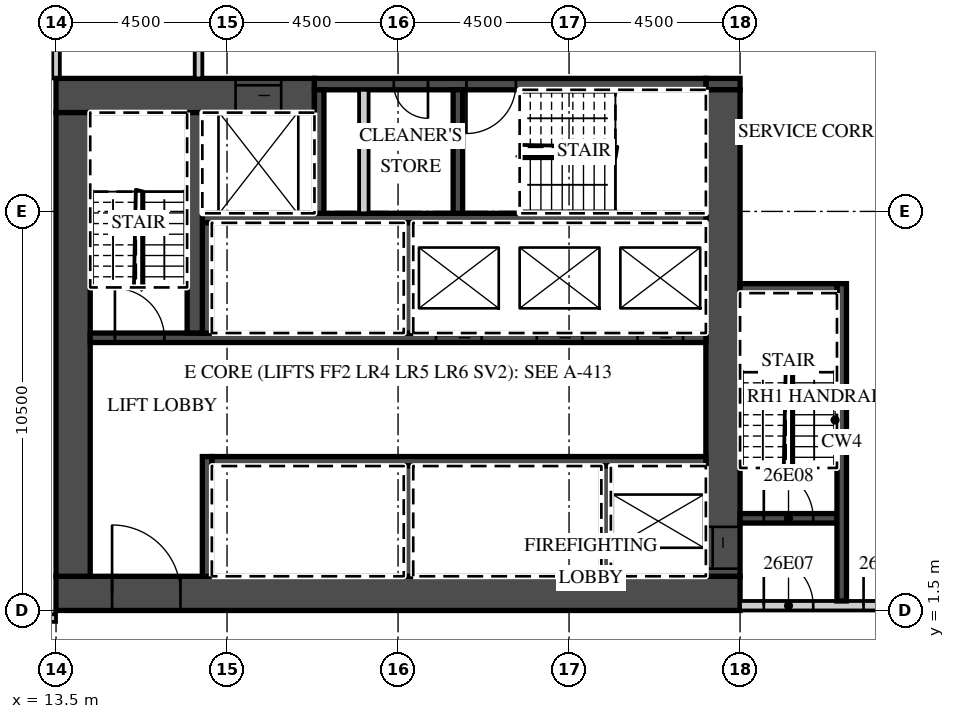
"""IFC4 building model, lengths in metres.
Left out: names, types, materials, properties, quantities, classifications, styles, units other than length and angle.
Written with IfcOpenShell. Run it as: python <this file> out.ifc"""

import sys

from ifc_helpers import new_model, si_unit, direction, frame, frame_2d, origin, place, context, subcontext, project, spatial, rectangle, extrude, element, fill, save


model = new_model("IFC4")
c1 = context("Model", 3, precision=1e-05, world=origin(), true_north=direction((0.0, 1.0)))
c2 = subcontext(c1, "Body", "Model", "MODEL_VIEW")
j1 = project(units=[si_unit("LENGTHUNIT", "METRE"), si_unit("PLANEANGLEUNIT", "RADIAN")], contexts=[c1])
p1 = place(None, origin())
s1 = spatial("IfcSite", under=j1, at=p1, CompositionType="ELEMENT")
p2 = place(p1, origin())
s2 = spatial("IfcBuilding", under=s1, at=p2, CompositionType="ELEMENT")
p3 = place(p2, frame((0.0, 0.0, 120.7)))
s3 = spatial("IfcBuildingStorey", under=s2, at=p3, CompositionType="ELEMENT", Elevation=120.7)
p4 = place(p3, frame((13.5, 15.5, 0.0), z_axis=(0.0, 0.0, 1.0), x_axis=(0.0, 1.0, 0.0)))
e1 = element("IfcWall", 1, at=p4, inside=s3, PredefinedType="PARTITIONING", context=c2, shape_type="SweptSolid", body=[
    extrude(rectangle(XDim=7.162, YDim=0.2, at=frame_2d((3.581, 0.0))), origin(), (0.0, 0.0, 1.0), 3.02),
])
p5 = place(p3, frame((-39.316, 1.3, 0.0), z_axis=(0.0, 0.0, 1.0), x_axis=(1.0, 0.0, 0.0)))
e2 = element("IfcWall", 2, at=p5, inside=s3, PredefinedType="PARTITIONING", context=c2, shape_type="SweptSolid", body=[
    extrude(rectangle(XDim=52.816, YDim=0.2, at=frame_2d((26.408, 0.0))), origin(), (0.0, 0.0, 1.0), 3.02),
])
p6 = place(p5, frame((0.15, 0.0, 0.0)))
e3 = element("IfcOpeningElement", 3, at=p6, cuts=e2, PredefinedType="OPENING", context=c2, shape_type="SweptSolid", body=[
    extrude(rectangle(XDim=0.9, YDim=2.1, at=frame_2d((0.45, 1.05))), frame((0.0, 0.11, 0.0), z_axis=(0.0, -1.0, 0.0), x_axis=(1.0, 0.0, 0.0)), (0.0, 0.0, 1.0), 0.22),
])
p7 = place(p5, frame((3.891, 0.0, 0.0)))
e4 = element("IfcOpeningElement", 4, at=p7, cuts=e2, PredefinedType="OPENING", context=c2, shape_type="SweptSolid", body=[
    extrude(rectangle(XDim=1.0, YDim=2.1, at=frame_2d((0.5, 1.05))), frame((0.0, 0.11, 0.0), z_axis=(0.0, -1.0, 0.0), x_axis=(1.0, 0.0, 0.0)), (0.0, 0.0, 1.0), 0.22),
])
p8 = place(p5, frame((10.741, 0.0, 0.0)))
e5 = element("IfcOpeningElement", 5, at=p8, cuts=e2, PredefinedType="OPENING", context=c2, shape_type="SweptSolid", body=[
    extrude(rectangle(XDim=1.0, YDim=2.1, at=frame_2d((0.5, 1.05))), frame((0.0, 0.11, 0.0), z_axis=(0.0, -1.0, 0.0), x_axis=(1.0, 0.0, 0.0)), (0.0, 0.0, 1.0), 0.22),
])
p9 = place(p5, frame((15.266, 0.0, 0.0)))
e6 = element("IfcOpeningElement", 6, at=p9, cuts=e2, PredefinedType="OPENING", context=c2, shape_type="SweptSolid", body=[
    extrude(rectangle(XDim=1.0, YDim=2.1, at=frame_2d((0.5, 1.05))), frame((0.0, 0.11, 0.0), z_axis=(0.0, -1.0, 0.0), x_axis=(1.0, 0.0, 0.0)), (0.0, 0.0, 1.0), 0.22),
])
p10 = place(p5, frame((19.741, 0.0, 0.0)))
e7 = element("IfcOpeningElement", 7, at=p10, cuts=e2, PredefinedType="OPENING", context=c2, shape_type="SweptSolid", body=[
    extrude(rectangle(XDim=1.0, YDim=2.1, at=frame_2d((0.5, 1.05))), frame((0.0, 0.11, 0.0), z_axis=(0.0, -1.0, 0.0), x_axis=(1.0, 0.0, 0.0)), (0.0, 0.0, 1.0), 0.22),
])
p11 = place(p5, frame((26.678, 0.0, 0.0)))
e8 = element("IfcOpeningElement", 8, at=p11, cuts=e2, PredefinedType="OPENING", context=c2, shape_type="SweptSolid", body=[
    extrude(rectangle(XDim=1.2, YDim=2.1, at=frame_2d((0.6, 1.05))), frame((0.0, 0.11, 0.0), z_axis=(0.0, -1.0, 0.0), x_axis=(1.0, 0.0, 0.0)), (0.0, 0.0, 1.0), 0.22),
])
p12 = place(p5, frame((35.678, 0.0, 0.0)))
e9 = element("IfcOpeningElement", 9, at=p12, cuts=e2, PredefinedType="OPENING", context=c2, shape_type="SweptSolid", body=[
    extrude(rectangle(XDim=1.2, YDim=2.1, at=frame_2d((0.6, 1.05))), frame((0.0, 0.11, 0.0), z_axis=(0.0, -1.0, 0.0), x_axis=(1.0, 0.0, 0.0)), (0.0, 0.0, 1.0), 0.22),
])
p13 = place(p5, frame((41.754, 0.0, 0.0)))
e10 = element("IfcOpeningElement", 10, at=p13, cuts=e2, PredefinedType="OPENING", context=c2, shape_type="SweptSolid", body=[
    extrude(rectangle(XDim=1.2, YDim=2.1, at=frame_2d((0.6, 1.05))), frame((0.0, 0.11, 0.0), z_axis=(0.0, -1.0, 0.0), x_axis=(1.0, 0.0, 0.0)), (0.0, 0.0, 1.0), 0.22),
])
p14 = place(p5, frame((51.241, 0.0, 0.0)))
e11 = element("IfcOpeningElement", 11, at=p14, cuts=e2, PredefinedType="OPENING", context=c2, shape_type="SweptSolid", body=[
    extrude(rectangle(XDim=1.0, YDim=2.1, at=frame_2d((0.5, 1.05))), frame((0.0, 0.11, 0.0), z_axis=(0.0, -1.0, 0.0), x_axis=(1.0, 0.0, 0.0)), (0.0, 0.0, 1.0), 0.22),
])
p15 = place(p3, frame((13.5, 1.95, 0.0), z_axis=(0.0, 0.0, 1.0), x_axis=(1.0, 0.0, 0.0)))
e12 = element("IfcWall", 12, at=p15, inside=s3, PredefinedType="SHEAR", context=c2, shape_type="SweptSolid", body=[
    extrude(rectangle(XDim=18.0, YDim=0.9, at=frame_2d((9.0, 0.0))), origin(), (0.0, 0.0, 1.0), 3.02),
])
p16 = place(p15, frame((1.475, 0.0, 0.0)))
e13 = element("IfcOpeningElement", 13, at=p16, cuts=e12, PredefinedType="OPENING", context=c2, shape_type="SweptSolid", body=[
    extrude(rectangle(XDim=1.8, YDim=2.1, at=frame_2d((0.9, 1.05))), frame((0.0, 0.46, 0.0), z_axis=(0.0, -1.0, 0.0), x_axis=(1.0, 0.0, 0.0)), (0.0, 0.0, 1.0), 0.92),
])
p17 = place(p3, frame((13.5, 15.05, 0.0), z_axis=(0.0, 0.0, 1.0), x_axis=(1.0, 0.0, 0.0)))
e14 = element("IfcWall", 14, at=p17, inside=s3, PredefinedType="SHEAR", context=c2, shape_type="SweptSolid", body=[
    extrude(rectangle(XDim=6.8, YDim=0.9, at=frame_2d((3.4, 0.0))), origin(), (0.0, 0.0, 1.0), 3.02),
])
p18 = place(p17, frame((4.725, 0.0, 0.0)))
e15 = element("IfcOpeningElement", 15, at=p18, cuts=e14, PredefinedType="OPENING", context=c2, shape_type="SweptSolid", body=[
    extrude(rectangle(XDim=1.2, YDim=2.1, at=frame_2d((0.6, 1.05))), frame((0.0, 0.46, 0.0), z_axis=(0.0, -1.0, 0.0), x_axis=(1.0, 0.0, 0.0)), (0.0, 0.0, 1.0), 0.92),
])
p19 = place(p3, frame((30.6, 15.35, 0.0), z_axis=(0.0, 0.0, 1.0), x_axis=(1.0, 0.0, 0.0)))
e16 = element("IfcWall", 16, at=p19, inside=s3, PredefinedType="SHEAR", context=c2, shape_type="SweptSolid", body=[
    extrude(rectangle(XDim=0.9, YDim=0.3, at=frame_2d((0.45, 0.0))), origin(), (0.0, 0.0, 1.0), 3.02),
])
p20 = place(p3, frame((20.3, 15.35, 0.0), z_axis=(0.0, 0.0, 1.0), x_axis=(1.0, 0.0, 0.0)))
e17 = element("IfcWall", 17, at=p20, inside=s3, PredefinedType="SHEAR", context=c2, shape_type="SweptSolid", body=[
    extrude(rectangle(XDim=10.3, YDim=0.3, at=frame_2d((5.15, 0.0))), origin(), (0.0, 0.0, 1.0), 3.02),
])
p21 = place(p20, frame((4.0, 0.0, 0.0)))
e18 = element("IfcOpeningElement", 18, at=p21, cuts=e17, PredefinedType="OPENING", context=c2, shape_type="SweptSolid", body=[
    extrude(rectangle(XDim=1.3, YDim=2.1, at=frame_2d((0.65, 1.05))), frame((0.0, 0.16, 0.0), z_axis=(0.0, -1.0, 0.0), x_axis=(1.0, 0.0, 0.0)), (0.0, 0.0, 1.0), 0.32),
])
p22 = place(p20, frame((2.087, 0.0, 0.0)))
e19 = element("IfcOpeningElement", 19, at=p22, cuts=e17, PredefinedType="OPENING", context=c2, shape_type="SweptSolid", body=[
    extrude(rectangle(XDim=0.9, YDim=2.1, at=frame_2d((0.45, 1.05))), frame((0.0, 0.16, 0.0), z_axis=(0.0, -1.0, 0.0), x_axis=(1.0, 0.0, 0.0)), (0.0, 0.0, 1.0), 0.32),
])
p23 = place(p3, frame((31.05, 2.4, 0.0), z_axis=(0.0, 0.0, 1.0), x_axis=(0.0, 1.0, 0.0)))
e20 = element("IfcWall", 20, at=p23, inside=s3, PredefinedType="SHEAR", context=c2, shape_type="SweptSolid", body=[
    extrude(rectangle(XDim=12.8, YDim=0.9, at=frame_2d((6.4, 0.0))), origin(), (0.0, 0.0, 1.0), 3.02),
])
p24 = place(p23, frame((0.2, 0.0, 0.0)))
e21 = element("IfcOpeningElement", 21, at=p24, cuts=e20, PredefinedType="OPENING", context=c2, shape_type="SweptSolid", body=[
    extrude(rectangle(XDim=1.1, YDim=2.1, at=frame_2d((0.55, 1.05))), frame((0.0, 0.46, 0.0), z_axis=(0.0, -1.0, 0.0), x_axis=(1.0, 0.0, 0.0)), (0.0, 0.0, 1.0), 0.92),
])
p25 = place(p3, frame((13.95, 2.4, 0.0), z_axis=(0.0, 0.0, 1.0), x_axis=(0.0, 1.0, 0.0)))
e22 = element("IfcWall", 22, at=p25, inside=s3, PredefinedType="SHEAR", context=c2, shape_type="SweptSolid", body=[
    extrude(rectangle(XDim=12.2, YDim=0.9, at=frame_2d((6.1, 0.0))), origin(), (0.0, 0.0, 1.0), 3.02),
])
p26 = place(p3, frame((17.6, 5.425, 0.0), z_axis=(0.0, 0.0, 1.0), x_axis=(1.0, 0.0, 0.0)))
e23 = element("IfcWall", 23, at=p26, inside=s3, PredefinedType="SHEAR", context=c2, shape_type="SweptSolid", body=[
    extrude(rectangle(XDim=13.0, YDim=0.25, at=frame_2d((6.5, 0.0))), origin(), (0.0, 0.0, 1.0), 3.02),
])
p27 = place(p3, frame((17.475, 2.4, 0.0), z_axis=(0.0, 0.0, 1.0), x_axis=(0.0, 1.0, 0.0)))
e24 = element("IfcWall", 24, at=p27, inside=s3, PredefinedType="SHEAR", context=c2, shape_type="SweptSolid", body=[
    extrude(rectangle(XDim=3.15, YDim=0.25, at=frame_2d((1.575, 0.0))), origin(), (0.0, 0.0, 1.0), 3.02),
])
for number, where, z_axis, x_axis in (
    (25, (27.975, 2.4, 0.0), (0.0, 0.0, 1.0), (0.0, 1.0, 0.0)),
    (26, (22.775, 2.4, 0.0), (0.0, 0.0, 1.0), (0.0, 1.0, 0.0)),
):
    element("IfcWall", number, at=place(p3, frame(where, z_axis=z_axis, x_axis=x_axis)), inside=s3, PredefinedType="SHEAR", context=c2, shape_type="SweptSolid", body=[
        extrude(rectangle(XDim=2.9, YDim=0.25, at=frame_2d((1.45, 0.0))), origin(), (0.0, 0.0, 1.0), 3.02),
    ])
p28 = place(p3, frame((14.4, 8.675, 0.0), z_axis=(0.0, 0.0, 1.0), x_axis=(1.0, 0.0, 0.0)))
e27 = element("IfcWall", 27, at=p28, inside=s3, PredefinedType="SHEAR", context=c2, shape_type="SweptSolid", body=[
    extrude(rectangle(XDim=16.2, YDim=0.25, at=frame_2d((8.1, 0.0))), origin(), (0.0, 0.0, 1.0), 3.02),
])
p29 = place(p28, frame((14.4, 0.0, 0.0)))
e28 = element("IfcOpeningElement", 28, at=p29, cuts=e27, PredefinedType="OPENING", context=c2, shape_type="SweptSolid", body=[
    extrude(rectangle(XDim=1.2, YDim=2.1, at=frame_2d((0.6, 1.05))), frame((0.0, 0.135, 0.0), z_axis=(0.0, -1.0, 0.0), x_axis=(1.0, 0.0, 0.0)), (0.0, 0.0, 1.0), 0.27),
])
p30 = place(p28, frame((11.75, 0.0, 0.0)))
e29 = element("IfcOpeningElement", 29, at=p30, cuts=e27, PredefinedType="OPENING", context=c2, shape_type="SweptSolid", body=[
    extrude(rectangle(XDim=1.2, YDim=2.1, at=frame_2d((0.6, 1.05))), frame((0.0, 0.135, 0.0), z_axis=(0.0, -1.0, 0.0), x_axis=(1.0, 0.0, 0.0)), (0.0, 0.0, 1.0), 0.27),
])
p31 = place(p28, frame((9.1, 0.0, 0.0)))
e30 = element("IfcOpeningElement", 30, at=p31, cuts=e27, PredefinedType="OPENING", context=c2, shape_type="SweptSolid", body=[
    extrude(rectangle(XDim=1.2, YDim=2.1, at=frame_2d((0.6, 1.05))), frame((0.0, 0.135, 0.0), z_axis=(0.0, -1.0, 0.0), x_axis=(1.0, 0.0, 0.0)), (0.0, 0.0, 1.0), 0.27),
])
p32 = place(p28, frame((0.65, 0.0, 0.0)))
e31 = element("IfcOpeningElement", 31, at=p32, cuts=e27, PredefinedType="OPENING", context=c2, shape_type="SweptSolid", body=[
    extrude(rectangle(XDim=1.3, YDim=2.1, at=frame_2d((0.65, 1.05))), frame((0.0, 0.135, 0.0), z_axis=(0.0, -1.0, 0.0), x_axis=(1.0, 0.0, 0.0)), (0.0, 0.0, 1.0), 0.27),
])
p33 = place(p3, frame((17.35, 11.825, 0.0), z_axis=(0.0, 0.0, 1.0), x_axis=(1.0, 0.0, 0.0)))
e32 = element("IfcWall", 32, at=p33, inside=s3, PredefinedType="SHEAR", context=c2, shape_type="SweptSolid", body=[
    extrude(rectangle(XDim=13.25, YDim=0.25, at=frame_2d((6.625, 0.0))), origin(), (0.0, 0.0, 1.0), 3.02),
])
for number, where, z_axis, x_axis in (
    (33, (17.475, 8.8, 0.0), (0.0, 0.0, 1.0), (0.0, 1.0, 0.0)),
    (34, (22.775, 8.8, 0.0), (0.0, 0.0, 1.0), (0.0, 1.0, 0.0)),
):
    element("IfcWall", number, at=place(p3, frame(where, z_axis=z_axis, x_axis=x_axis)), inside=s3, PredefinedType="SHEAR", context=c2, shape_type="SweptSolid", body=[
        extrude(rectangle(XDim=2.9, YDim=0.25, at=frame_2d((1.45, 0.0))), origin(), (0.0, 0.0, 1.0), 3.02),
    ])
p34 = place(p3, frame((17.15, 8.8, 0.0), z_axis=(0.0, 0.0, 1.0), x_axis=(0.0, 1.0, 0.0)))
e35 = element("IfcWall", 35, at=p34, inside=s3, PredefinedType="SHEAR", context=c2, shape_type="SweptSolid", body=[
    extrude(rectangle(XDim=5.8, YDim=0.4, at=frame_2d((2.9, 0.0))), origin(), (0.0, 0.0, 1.0), 3.02),
])
for number, where, z_axis, x_axis in (
    (36, (20.425, 11.95, 0.0), (0.0, 0.0, 1.0), (0.0, 1.0, 0.0)),
    (37, (24.075, 11.95, 0.0), (0.0, 0.0, 1.0), (0.0, 1.0, 0.0)),
):
    element("IfcWall", number, at=place(p3, frame(where, z_axis=z_axis, x_axis=x_axis)), inside=s3, PredefinedType="SHEAR", context=c2, shape_type="SweptSolid", body=[
        extrude(rectangle(XDim=3.25, YDim=0.25, at=frame_2d((1.625, 0.0))), origin(), (0.0, 0.0, 1.0), 3.02),
    ])
p35 = place(p3, frame((21.6, 11.95, 0.0), z_axis=(0.0, 0.0, 1.0), x_axis=(0.0, 1.0, 0.0)))
e38 = element("IfcWall", 38, at=p35, inside=s3, PredefinedType="PARTITIONING", context=c2, shape_type="SweptSolid", body=[
    extrude(rectangle(XDim=3.25, YDim=0.25, at=frame_2d((1.625, 0.0))), origin(), (0.0, 0.0, 1.0), 3.02),
])
p36 = place(p3, frame((31.5, 1.625, 0.0), z_axis=(0.0, 0.0, 1.0), x_axis=(1.0, 0.0, 0.0)))
e39 = element("IfcWall", 39, at=p36, inside=s3, PredefinedType="PARTITIONING", context=c2, shape_type="SweptSolid", body=[
    extrude(rectangle(XDim=15.65, YDim=0.25, at=frame_2d((7.825, 0.0))), origin(), (0.0, 0.0, 1.0), 3.02),
])
p37 = place(p36, frame((0.625, 0.0, 0.0)))
e40 = element("IfcOpeningElement", 40, at=p37, cuts=e39, PredefinedType="OPENING", context=c2, shape_type="SweptSolid", body=[
    extrude(rectangle(XDim=1.3, YDim=2.1, at=frame_2d((0.65, 1.05))), frame((0.0, 0.135, 0.0), z_axis=(0.0, -1.0, 0.0), x_axis=(1.0, 0.0, 0.0)), (0.0, 0.0, 1.0), 0.27),
])
p38 = place(p36, frame((3.25, 0.0, 0.0)))
e41 = element("IfcOpeningElement", 41, at=p38, cuts=e39, PredefinedType="OPENING", context=c2, shape_type="SweptSolid", body=[
    extrude(rectangle(XDim=1.1, YDim=2.1, at=frame_2d((0.55, 1.05))), frame((0.0, 0.135, 0.0), z_axis=(0.0, -1.0, 0.0), x_axis=(1.0, 0.0, 0.0)), (0.0, 0.0, 1.0), 0.27),
])
p39 = place(p3, frame((31.5, 3.925, 0.0), z_axis=(0.0, 0.0, 1.0), x_axis=(1.0, 0.0, 0.0)))
e42 = element("IfcWall", 42, at=p39, inside=s3, PredefinedType="SHEAR", context=c2, shape_type="SweptSolid", body=[
    extrude(rectangle(XDim=2.55, YDim=0.25, at=frame_2d((1.275, 0.0))), origin(), (0.0, 0.0, 1.0), 3.02),
])
p40 = place(p39, frame((0.625, 0.0, 0.0)))
e43 = element("IfcOpeningElement", 43, at=p40, cuts=e42, PredefinedType="OPENING", context=c2, shape_type="SweptSolid", body=[
    extrude(rectangle(XDim=1.3, YDim=2.1, at=frame_2d((0.65, 1.05))), frame((0.0, 0.135, 0.0), z_axis=(0.0, -1.0, 0.0), x_axis=(1.0, 0.0, 0.0)), (0.0, 0.0, 1.0), 0.27),
])
p41 = place(p3, frame((34.175, 1.75, 0.0), z_axis=(0.0, 0.0, 1.0), x_axis=(0.0, 1.0, 0.0)))
e44 = element("IfcWall", 44, at=p41, inside=s3, PredefinedType="SHEAR", context=c2, shape_type="SweptSolid", body=[
    extrude(rectangle(XDim=8.35, YDim=0.25, at=frame_2d((4.175, 0.0))), origin(), (0.0, 0.0, 1.0), 3.02),
])
p42 = place(p3, frame((31.5, 9.975, 0.0), z_axis=(0.0, 0.0, 1.0), x_axis=(1.0, 0.0, 0.0)))
e45 = element("IfcWall", 45, at=p42, inside=s3, PredefinedType="SHEAR", context=c2, shape_type="SweptSolid", body=[
    extrude(rectangle(XDim=2.55, YDim=0.25, at=frame_2d((1.275, 0.0))), origin(), (0.0, 0.0, 1.0), 3.02),
])
p43 = place(p3, frame((17.25, 15.5, 0.0), z_axis=(0.0, 0.0, 1.0), x_axis=(0.0, 1.0, 0.0)))
e46 = element("IfcWall", 46, at=p43, inside=s3, PredefinedType="PARTITIONING", context=c2, shape_type="SweptSolid", body=[
    extrude(rectangle(XDim=2.2, YDim=0.2, at=frame_2d((1.1, 0.0))), origin(), (0.0, 0.0, 1.0), 3.02),
])
p44 = place(p29, origin())
e47 = element("IfcDoor", 47, at=p44, inside=s3, OperationType="SLIDING_TO_LEFT", PredefinedType="DOOR", context=c2, shape_type="SweptSolid", body=[
    extrude(rectangle(XDim=1.2, YDim=2.1, at=frame_2d((0.6, 1.05))), frame((0.0, 0.025, 0.0), z_axis=(0.0, -1.0, 0.0), x_axis=(1.0, 0.0, 0.0)), (0.0, 0.0, 1.0), 0.05),
])
fill(e28, e47)
p45 = place(p30, origin())
e48 = element("IfcDoor", 48, at=p45, inside=s3, OperationType="SLIDING_TO_RIGHT", PredefinedType="DOOR", context=c2, shape_type="SweptSolid", body=[
    extrude(rectangle(XDim=1.2, YDim=2.1, at=frame_2d((0.6, 1.05))), frame((0.0, 0.025, 0.0), z_axis=(0.0, -1.0, 0.0), x_axis=(1.0, 0.0, 0.0)), (0.0, 0.0, 1.0), 0.05),
])
fill(e29, e48)
p46 = place(p31, origin())
e49 = element("IfcDoor", 49, at=p46, inside=s3, OperationType="SLIDING_TO_RIGHT", PredefinedType="DOOR", context=c2, shape_type="SweptSolid", body=[
    extrude(rectangle(XDim=1.2, YDim=2.1, at=frame_2d((0.6, 1.05))), frame((0.0, 0.025, 0.0), z_axis=(0.0, -1.0, 0.0), x_axis=(1.0, 0.0, 0.0)), (0.0, 0.0, 1.0), 0.05),
])
fill(e30, e49)
p47 = place(p18, origin())
e50 = element("IfcDoor", 50, at=p47, inside=s3, OperationType="SLIDING_TO_LEFT", PredefinedType="DOOR", context=c2, shape_type="SweptSolid", body=[
    extrude(rectangle(XDim=1.2, YDim=2.1, at=frame_2d((0.6, 1.05))), frame((0.0, 0.025, 0.0), z_axis=(0.0, -1.0, 0.0), x_axis=(1.0, 0.0, 0.0)), (0.0, 0.0, 1.0), 0.05),
])
fill(e15, e50)
p48 = place(p24, origin())
e51 = element("IfcDoor", 51, at=p48, inside=s3, OperationType="SLIDING_TO_LEFT", PredefinedType="DOOR", context=c2, shape_type="SweptSolid", body=[
    extrude(rectangle(XDim=1.1, YDim=2.1, at=frame_2d((0.55, 1.05))), frame((0.0, 0.025, 0.0), z_axis=(0.0, -1.0, 0.0), x_axis=(1.0, 0.0, 0.0)), (0.0, 0.0, 1.0), 0.05),
])
fill(e21, e51)
p49 = place(p16, origin())
e52 = element("IfcDoor", 52, at=p49, inside=s3, OperationType="DOUBLE_DOOR_DOUBLE_SWING", PredefinedType="DOOR", context=c2, shape_type="SweptSolid", body=[
    extrude(rectangle(XDim=1.8, YDim=2.1, at=frame_2d((0.9, 1.05))), frame((0.0, 0.025, 0.0), z_axis=(0.0, -1.0, 0.0), x_axis=(1.0, 0.0, 0.0)), (0.0, 0.0, 1.0), 0.05),
])
fill(e13, e52)
p50 = place(p37, origin())
e53 = element("IfcDoor", 53, at=p50, inside=s3, OperationType="SINGLE_SWING_LEFT", PredefinedType="DOOR", context=c2, shape_type="SweptSolid", body=[
    extrude(rectangle(XDim=1.3, YDim=2.1, at=frame_2d((0.65, 1.05))), frame((0.0, 0.025, 0.0), z_axis=(0.0, -1.0, 0.0), x_axis=(1.0, 0.0, 0.0)), (0.0, 0.0, 1.0), 0.05),
])
fill(e40, e53)
p51 = place(p40, origin())
e54 = element("IfcDoor", 54, at=p51, inside=s3, OperationType="SINGLE_SWING_LEFT", PredefinedType="DOOR", context=c2, shape_type="SweptSolid", body=[
    extrude(rectangle(XDim=1.3, YDim=2.1, at=frame_2d((0.65, 1.05))), frame((0.0, 0.025, 0.0), z_axis=(0.0, -1.0, 0.0), x_axis=(1.0, 0.0, 0.0)), (0.0, 0.0, 1.0), 0.05),
])
fill(e43, e54)
p52 = place(p38, origin())
e55 = element("IfcDoor", 55, at=p52, inside=s3, OperationType="SINGLE_SWING_LEFT", PredefinedType="DOOR", context=c2, shape_type="SweptSolid", body=[
    extrude(rectangle(XDim=1.1, YDim=2.1, at=frame_2d((0.55, 1.05))), frame((0.0, 0.025, 0.0), z_axis=(0.0, -1.0, 0.0), x_axis=(1.0, 0.0, 0.0)), (0.0, 0.0, 1.0), 0.05),
])
fill(e41, e55)
p53 = place(p32, origin())
e56 = element("IfcDoor", 56, at=p53, inside=s3, OperationType="SINGLE_SWING_LEFT", PredefinedType="DOOR", context=c2, shape_type="SweptSolid", body=[
    extrude(rectangle(XDim=1.3, YDim=2.1, at=frame_2d((0.65, 1.05))), frame((0.0, 0.025, 0.0), z_axis=(0.0, -1.0, 0.0), x_axis=(1.0, 0.0, 0.0)), (0.0, 0.0, 1.0), 0.05),
])
fill(e31, e56)
p54 = place(p21, origin())
e57 = element("IfcDoor", 57, at=p54, inside=s3, OperationType="SINGLE_SWING_LEFT", PredefinedType="DOOR", context=c2, shape_type="SweptSolid", body=[
    extrude(rectangle(XDim=1.3, YDim=2.1, at=frame_2d((0.65, 1.05))), frame((0.0, 0.025, 0.0), z_axis=(0.0, -1.0, 0.0), x_axis=(1.0, 0.0, 0.0)), (0.0, 0.0, 1.0), 0.05),
])
fill(e18, e57)
p55 = place(p22, origin())
e58 = element("IfcDoor", 58, at=p55, inside=s3, OperationType="SINGLE_SWING_RIGHT", PredefinedType="DOOR", context=c2, shape_type="SweptSolid", body=[
    extrude(rectangle(XDim=0.9, YDim=2.1, at=frame_2d((0.45, 1.05))), frame((0.0, 0.025, 0.0), z_axis=(0.0, -1.0, 0.0), x_axis=(1.0, 0.0, 0.0)), (0.0, 0.0, 1.0), 0.05),
])
fill(e19, e58)
save(model, sys.argv[1])
